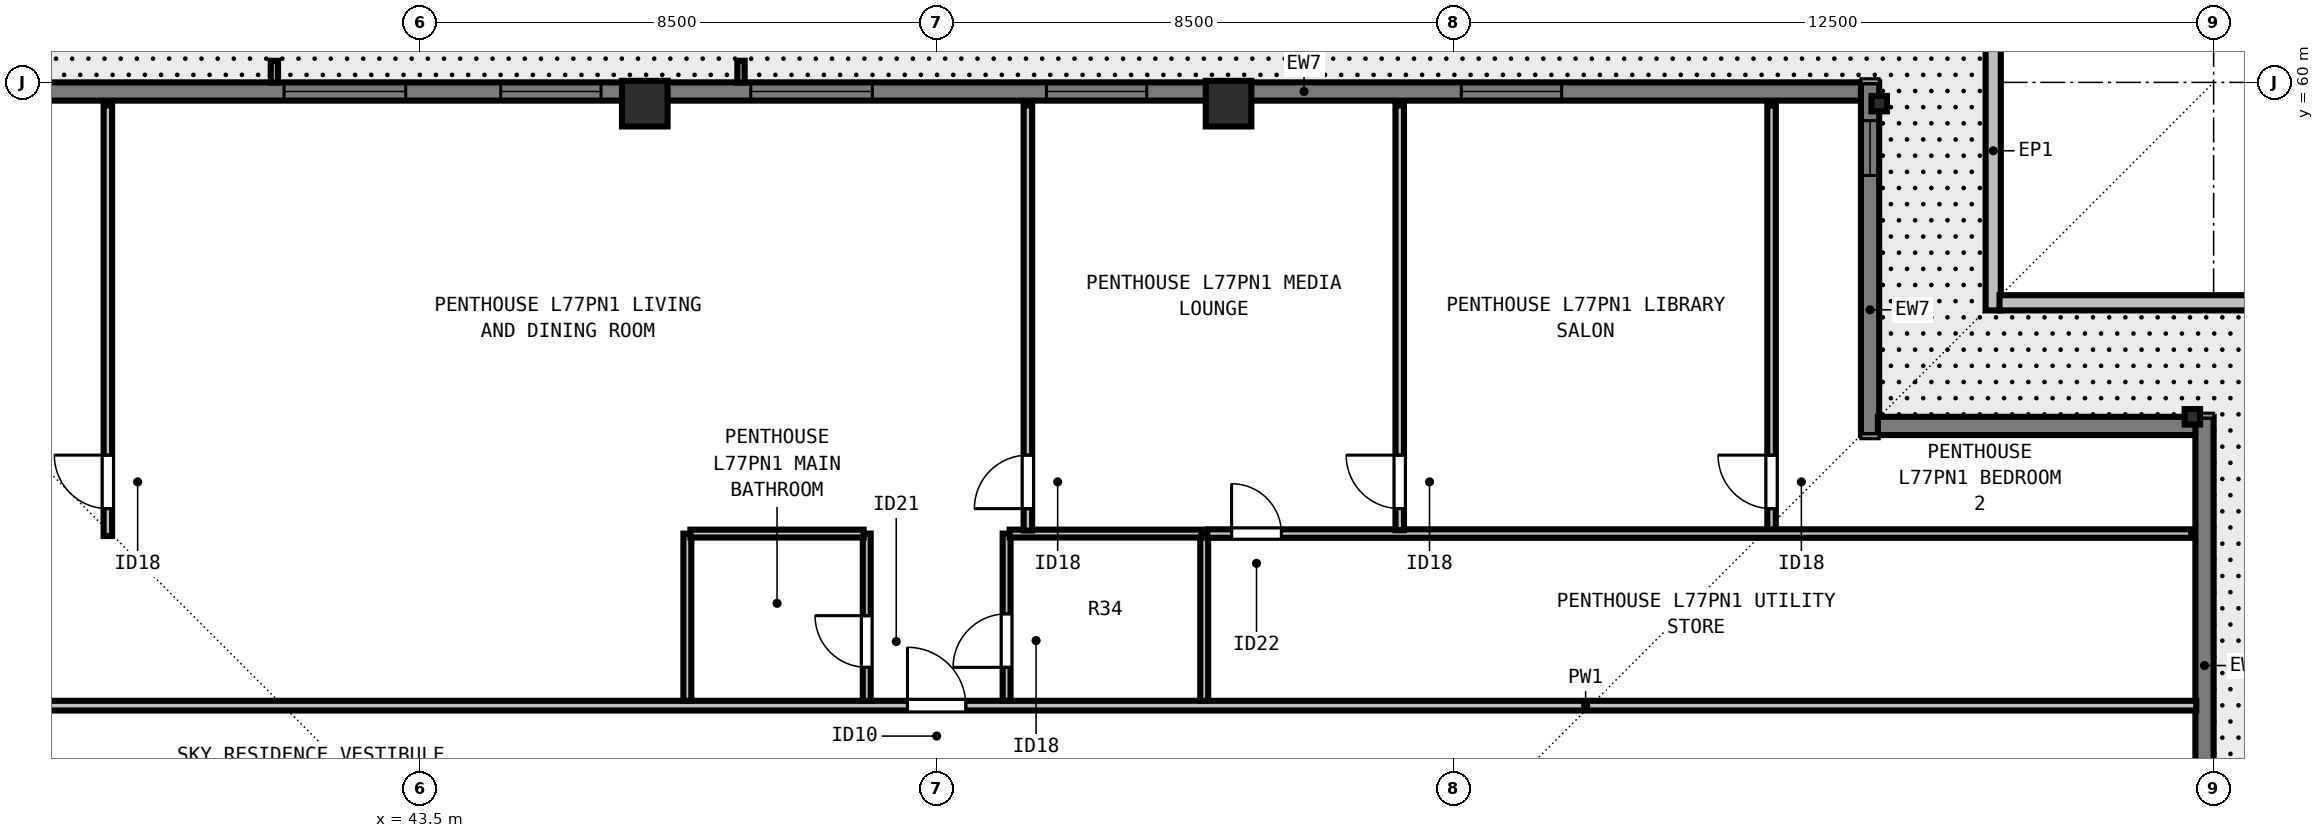
"""IFC4 building model, lengths in metres.
Left out: names, types, materials, properties, quantities, classifications, styles, units other than length and angle.
Written with IfcOpenShell. Run it as: python <this file> out.ifc"""

import sys

from ifc_helpers import new_model, si_unit, direction, frame, frame_2d, origin, origin_2d, place, context, subcontext, project, spatial, rectangle, i_section, extrude, element, fill, save


model = new_model("IFC4")
c1 = context("Model", 3, precision=1e-05, world=origin(), true_north=direction((0.0, 1.0)))
c2 = subcontext(c1, "Body", "Model", "MODEL_VIEW")
j1 = project(units=[si_unit("LENGTHUNIT", "METRE"), si_unit("PLANEANGLEUNIT", "RADIAN")], contexts=[c1])
p1 = place(None, origin())
s1 = spatial("IfcSite", under=j1, at=p1, CompositionType="ELEMENT")
p2 = place(p1, origin())
s2 = spatial("IfcBuilding", under=s1, at=p2, CompositionType="ELEMENT")
p3 = place(p2, frame((0.0, 0.0, 280.5)))
s3 = spatial("IfcBuildingStorey", under=s2, at=p3, CompositionType="ELEMENT", Elevation=280.5)
for number, where, z_axis, x_axis in (
    (1, (72.65, 54.5, 0.0), (0.0, 0.0, 1.0), (0.0, 1.0, 0.0)),
    (2, (67.5, 59.65, 0.0), (0.0, 0.0, 1.0), (1.0, 0.0, 0.0)),
):
    element("IfcColumn", number, at=place(p3, frame(where, z_axis=z_axis, x_axis=x_axis)), inside=s3, PredefinedType="COLUMN", context=c2, shape_type="SweptSolid", body=[
        extrude(i_section(OverallWidth=0.254, OverallDepth=0.254, WebThickness=0.009, FlangeThickness=0.014, FilletRadius=0.013, at=origin_2d()), origin(), (0.0, 0.0, 1.0), 3.5),
    ])
for number, where, z_axis, x_axis in (
    (3, (56.8, 59.65, 0.0), (0.0, 0.0, 1.0), (1.0, 0.0, 0.0)),
    (4, (47.2, 59.65, 0.0), (0.0, 0.0, 1.0), (1.0, 0.0, 0.0)),
):
    element("IfcColumn", number, at=place(p3, frame(where, z_axis=z_axis, x_axis=x_axis)), inside=s3, PredefinedType="COLUMN", context=c2, shape_type="SweptSolid", body=[
        extrude(rectangle(XDim=0.75, YDim=0.75, at=origin_2d()), origin(), (0.0, 0.0, 1.0), 3.5),
    ])
p4 = place(p3, frame((69.375, 61.5, 0.0), z_axis=(0.0, 0.0, 1.0), x_axis=(0.0, -1.0, 0.0)))
e5 = element("IfcWall", 5, at=p4, inside=s3, PredefinedType="PARAPET", context=c2, shape_type="SweptSolid", body=[
    extrude(rectangle(XDim=5.25, YDim=0.25, at=frame_2d((2.625, 0.0))), origin(), (0.0, 0.0, 1.0), 1.15),
])
p5 = place(p3, frame((69.478, 56.375, 0.0), z_axis=(0.0, 0.0, 1.0), x_axis=(1.0, 0.0, 0.0)))
e6 = element("IfcWall", 6, at=p5, inside=s3, PredefinedType="PARAPET", context=c2, shape_type="SweptSolid", body=[
    extrude(rectangle(XDim=4.794, YDim=0.25, at=frame_2d((2.397, 0.0))), origin(), (0.0, 0.0, 1.0), 1.15),
])
p6 = place(p3, frame((36.5, 59.85, 0.0), z_axis=(0.0, 0.0, 1.0), x_axis=(1.0, 0.0, 0.0)))
e7 = element("IfcWall", 7, at=p6, inside=s3, PredefinedType="SOLIDWALL", context=c2, shape_type="SweptSolid", body=[
    extrude(rectangle(XDim=30.722, YDim=0.3, at=frame_2d((15.361, 0.0))), origin(), (0.0, 0.0, 1.0), 3.29),
])
p7 = place(p6, frame((4.769, 0.0, 0.8)))
e8 = element("IfcOpeningElement", 8, at=p7, cuts=e7, PredefinedType="OPENING", context=c2, shape_type="SweptSolid", body=[
    extrude(rectangle(XDim=2.0, YDim=1.758, at=frame_2d((1.0, 0.879))), frame((0.0, 0.16, 0.0), z_axis=(0.0, -1.0, 0.0), x_axis=(1.0, 0.0, 0.0)), (0.0, 0.0, 1.0), 0.32),
])
p8 = place(p6, frame((8.331, 0.0, 0.8)))
e9 = element("IfcOpeningElement", 9, at=p8, cuts=e7, PredefinedType="OPENING", context=c2, shape_type="SweptSolid", body=[
    extrude(rectangle(XDim=1.65, YDim=1.758, at=frame_2d((0.825, 0.879))), frame((0.0, 0.16, 0.0), z_axis=(0.0, -1.0, 0.0), x_axis=(1.0, 0.0, 0.0)), (0.0, 0.0, 1.0), 0.32),
])
p9 = place(p6, frame((12.442, 0.0, 0.8)))
e10 = element("IfcOpeningElement", 10, at=p9, cuts=e7, PredefinedType="OPENING", context=c2, shape_type="SweptSolid", body=[
    extrude(rectangle(XDim=2.0, YDim=1.758, at=frame_2d((1.0, 0.879))), frame((0.0, 0.16, 0.0), z_axis=(0.0, -1.0, 0.0), x_axis=(1.0, 0.0, 0.0)), (0.0, 0.0, 1.0), 0.32),
])
p10 = place(p6, frame((17.304, 0.0, 0.8)))
e11 = element("IfcOpeningElement", 11, at=p10, cuts=e7, PredefinedType="OPENING", context=c2, shape_type="SweptSolid", body=[
    extrude(rectangle(XDim=1.65, YDim=1.758, at=frame_2d((0.825, 0.879))), frame((0.0, 0.16, 0.0), z_axis=(0.0, -1.0, 0.0), x_axis=(1.0, 0.0, 0.0)), (0.0, 0.0, 1.0), 0.32),
])
p11 = place(p6, frame((24.128, 0.0, 0.8)))
e12 = element("IfcOpeningElement", 12, at=p11, cuts=e7, PredefinedType="OPENING", context=c2, shape_type="SweptSolid", body=[
    extrude(rectangle(XDim=1.65, YDim=1.758, at=frame_2d((0.825, 0.879))), frame((0.0, 0.16, 0.0), z_axis=(0.0, -1.0, 0.0), x_axis=(1.0, 0.0, 0.0)), (0.0, 0.0, 1.0), 0.32),
])
p12 = place(p3, frame((67.35, 60.0, 0.0), z_axis=(0.0, 0.0, 1.0), x_axis=(0.0, -1.0, 0.0)))
e13 = element("IfcWall", 13, at=p12, inside=s3, PredefinedType="SOLIDWALL", context=c2, shape_type="SweptSolid", body=[
    extrude(rectangle(XDim=5.8, YDim=0.3, at=frame_2d((2.9, 0.0))), origin(), (0.0, 0.0, 1.0), 3.29),
])
p13 = place(p12, frame((0.63, 0.0, 0.8)))
e14 = element("IfcOpeningElement", 14, at=p13, cuts=e13, PredefinedType="OPENING", context=c2, shape_type="SweptSolid", body=[
    extrude(rectangle(XDim=0.9, YDim=1.75, at=frame_2d((0.45, 0.875))), frame((0.0, 0.16, 0.0), z_axis=(0.0, -1.0, 0.0), x_axis=(1.0, 0.0, 0.0)), (0.0, 0.0, 1.0), 0.32),
])
p14 = place(p3, frame((67.478, 54.35, 0.0), z_axis=(0.0, 0.0, 1.0), x_axis=(1.0, 0.0, 0.0)))
e15 = element("IfcWall", 15, at=p14, inside=s3, PredefinedType="SOLIDWALL", context=c2, shape_type="SweptSolid", body=[
    extrude(rectangle(XDim=5.244, YDim=0.3, at=frame_2d((2.622, 0.0))), origin(), (0.0, 0.0, 1.0), 3.29),
])
p15 = place(p3, frame((72.85, 54.5, 0.0), z_axis=(0.0, 0.0, 1.0), x_axis=(0.0, -1.0, 0.0)))
e16 = element("IfcWall", 16, at=p15, inside=s3, PredefinedType="SOLIDWALL", context=c2, shape_type="SweptSolid", body=[
    extrude(rectangle(XDim=30.722, YDim=0.3, at=frame_2d((15.361, 0.0))), origin(), (0.0, 0.0, 1.0), 3.29),
])
p16 = place(p15, frame((8.331, 0.0, 0.8)))
e17 = element("IfcOpeningElement", 17, at=p16, cuts=e16, PredefinedType="OPENING", context=c2, shape_type="SweptSolid", body=[
    extrude(rectangle(XDim=1.65, YDim=1.758, at=frame_2d((0.825, 0.879))), frame((0.0, 0.16, 0.0), z_axis=(0.0, -1.0, 0.0), x_axis=(1.0, 0.0, 0.0)), (0.0, 0.0, 1.0), 0.32),
])
p17 = place(p15, frame((11.593, 0.0, 0.8)))
e18 = element("IfcOpeningElement", 18, at=p17, cuts=e16, PredefinedType="OPENING", context=c2, shape_type="SweptSolid", body=[
    extrude(rectangle(XDim=2.0, YDim=1.758, at=frame_2d((1.0, 0.879))), frame((0.0, 0.16, 0.0), z_axis=(0.0, -1.0, 0.0), x_axis=(1.0, 0.0, 0.0)), (0.0, 0.0, 1.0), 0.32),
])
p18 = place(p15, frame((16.455, 0.0, 0.8)))
e19 = element("IfcOpeningElement", 19, at=p18, cuts=e16, PredefinedType="OPENING", context=c2, shape_type="SweptSolid", body=[
    extrude(rectangle(XDim=1.65, YDim=1.758, at=frame_2d((0.825, 0.879))), frame((0.0, 0.16, 0.0), z_axis=(0.0, -1.0, 0.0), x_axis=(1.0, 0.0, 0.0)), (0.0, 0.0, 1.0), 0.32),
])
p19 = place(p15, frame((20.967, 0.0, 0.8)))
e20 = element("IfcOpeningElement", 20, at=p19, cuts=e16, PredefinedType="OPENING", context=c2, shape_type="SweptSolid", body=[
    extrude(rectangle(XDim=2.0, YDim=1.758, at=frame_2d((1.0, 0.879))), frame((0.0, 0.16, 0.0), z_axis=(0.0, -1.0, 0.0), x_axis=(1.0, 0.0, 0.0)), (0.0, 0.0, 1.0), 0.32),
])
p20 = place(p3, frame((31.285, 49.75, 0.0), z_axis=(0.0, 0.0, 1.0), x_axis=(1.0, 0.0, 0.0)))
e21 = element("IfcWall", 21, at=p20, inside=s3, PredefinedType="PARTITIONING", context=c2, shape_type="SweptSolid", body=[
    extrude(rectangle(XDim=41.43, YDim=0.16, at=frame_2d((20.715, 0.0))), origin(), (0.0, 0.0, 1.0), 3.009),
])
p21 = place(p20, frame((20.235, 0.0, 0.0)))
e22 = element("IfcOpeningElement", 22, at=p21, cuts=e21, PredefinedType="OPENING", context=c2, shape_type="SweptSolid", body=[
    extrude(rectangle(XDim=0.96, YDim=2.18, at=frame_2d((0.48, 1.09))), frame((0.0, 0.09, 0.0), z_axis=(0.0, -1.0, 0.0), x_axis=(1.0, 0.0, 0.0)), (0.0, 0.0, 1.0), 0.18),
])
p22 = place(p3, frame((47.9, 49.83, 0.0), z_axis=(0.0, 0.0, 1.0), x_axis=(0.0, 1.0, 0.0)))
e23 = element("IfcWall", 23, at=p22, inside=s3, PredefinedType="PLUMBINGWALL", context=c2, shape_type="SweptSolid", body=[
    extrude(rectangle(XDim=2.75, YDim=0.13, at=frame_2d((1.375, 0.0))), origin(), (0.0, 0.0, 1.0), 3.29),
])
p23 = place(p3, frame((50.85, 49.83, 0.0), z_axis=(0.0, 0.0, 1.0), x_axis=(0.0, 1.0, 0.0)))
e24 = element("IfcWall", 24, at=p23, inside=s3, PredefinedType="PLUMBINGWALL", context=c2, shape_type="SweptSolid", body=[
    extrude(rectangle(XDim=2.75, YDim=0.13, at=frame_2d((1.375, 0.0))), origin(), (0.0, 0.0, 1.0), 3.009),
])
p24 = place(p23, frame((0.55, 0.0, 0.0)))
e25 = element("IfcOpeningElement", 25, at=p24, cuts=e24, PredefinedType="OPENING", context=c2, shape_type="SweptSolid", body=[
    extrude(rectangle(XDim=0.85, YDim=2.08, at=frame_2d((0.425, 1.04))), frame((0.0, 0.075, 0.0), z_axis=(0.0, -1.0, 0.0), x_axis=(1.0, 0.0, 0.0)), (0.0, 0.0, 1.0), 0.15),
])
p25 = place(p3, frame((47.95, 52.58, 0.0), z_axis=(0.0, 0.0, 1.0), x_axis=(1.0, 0.0, 0.0)))
e26 = element("IfcWall", 26, at=p25, inside=s3, PredefinedType="PLUMBINGWALL", context=c2, shape_type="SweptSolid", body=[
    extrude(rectangle(XDim=2.85, YDim=0.13, at=frame_2d((1.425, 0.0))), origin(), (0.0, 0.0, 1.0), 3.29),
])
p26 = place(p3, frame((56.4, 49.83, 0.0), z_axis=(0.0, 0.0, 1.0), x_axis=(0.0, 1.0, 0.0)))
e27 = element("IfcWall", 27, at=p26, inside=s3, PredefinedType="PLUMBINGWALL", context=c2, shape_type="SweptSolid", body=[
    extrude(rectangle(XDim=2.75, YDim=0.13, at=frame_2d((1.375, 0.0))), origin(), (0.0, 0.0, 1.0), 3.29),
])
p27 = place(p3, frame((53.15, 49.83, 0.0), z_axis=(0.0, 0.0, 1.0), x_axis=(0.0, 1.0, 0.0)))
e28 = element("IfcWall", 28, at=p27, inside=s3, PredefinedType="PLUMBINGWALL", context=c2, shape_type="SweptSolid", body=[
    extrude(rectangle(XDim=2.75, YDim=0.13, at=frame_2d((1.375, 0.0))), origin(), (0.0, 0.0, 1.0), 3.29),
])
p28 = place(p27, frame((0.55, 0.0, 0.0)))
e29 = element("IfcOpeningElement", 29, at=p28, cuts=e28, PredefinedType="OPENING", context=c2, shape_type="SweptSolid", body=[
    extrude(rectangle(XDim=0.88, YDim=2.1, at=frame_2d((0.44, 1.05))), frame((0.0, 0.075, 0.0), z_axis=(0.0, -1.0, 0.0), x_axis=(1.0, 0.0, 0.0)), (0.0, 0.0, 1.0), 0.15),
])
p29 = place(p3, frame((53.2, 52.58, 0.0), z_axis=(0.0, 0.0, 1.0), x_axis=(1.0, 0.0, 0.0)))
e30 = element("IfcWall", 30, at=p29, inside=s3, PredefinedType="PLUMBINGWALL", context=c2, shape_type="SweptSolid", body=[
    extrude(rectangle(XDim=3.15, YDim=0.13, at=frame_2d((1.575, 0.0))), origin(), (0.0, 0.0, 1.0), 3.29),
])
p30 = place(p3, frame((38.37, 52.54, 0.0), z_axis=(0.0, 0.0, 1.0), x_axis=(0.0, 1.0, 0.0)))
e31 = element("IfcWall", 31, at=p30, inside=s3, PredefinedType="PARTITIONING", context=c2, shape_type="SweptSolid", body=[
    extrude(rectangle(XDim=7.08, YDim=0.14, at=frame_2d((3.54, 0.0))), origin(), (0.0, 0.0, 1.0), 2.653),
])
p31 = place(p30, frame((0.45, 0.0, 0.0)))
e32 = element("IfcOpeningElement", 32, at=p31, cuts=e31, PredefinedType="OPENING", context=c2, shape_type="SweptSolid", body=[
    extrude(rectangle(XDim=0.88, YDim=2.1, at=frame_2d((0.44, 1.05))), frame((0.0, 0.08, 0.0), z_axis=(0.0, -1.0, 0.0), x_axis=(1.0, 0.0, 0.0)), (0.0, 0.0, 1.0), 0.16),
])
p32 = place(p3, frame((65.73, 52.54, 0.0), z_axis=(0.0, 0.0, 1.0), x_axis=(0.0, 1.0, 0.0)))
e33 = element("IfcWall", 33, at=p32, inside=s3, PredefinedType="PARTITIONING", context=c2, shape_type="SweptSolid", body=[
    extrude(rectangle(XDim=7.08, YDim=0.14, at=frame_2d((3.54, 0.0))), origin(), (0.0, 0.0, 1.0), 2.653),
])
p33 = place(p32, frame((0.45, 0.0, 0.0)))
e34 = element("IfcOpeningElement", 34, at=p33, cuts=e33, PredefinedType="OPENING", context=c2, shape_type="SweptSolid", body=[
    extrude(rectangle(XDim=0.88, YDim=2.1, at=frame_2d((0.44, 1.05))), frame((0.0, 0.08, 0.0), z_axis=(0.0, -1.0, 0.0), x_axis=(1.0, 0.0, 0.0)), (0.0, 0.0, 1.0), 0.16),
])
p34 = place(p3, frame((56.45, 52.58, 0.0), z_axis=(0.0, 0.0, 1.0), x_axis=(1.0, 0.0, 0.0)))
e35 = element("IfcWall", 35, at=p34, inside=s3, PredefinedType="PARTITIONING", context=c2, shape_type="SweptSolid", body=[
    extrude(rectangle(XDim=16.18, YDim=0.14, at=frame_2d((8.09, 0.0))), origin(), (0.0, 0.0, 1.0), 3.009),
])
p35 = place(p34, frame((0.4, 0.0, 0.0)))
e36 = element("IfcOpeningElement", 36, at=p35, cuts=e35, PredefinedType="OPENING", context=c2, shape_type="SweptSolid", body=[
    extrude(rectangle(XDim=0.82, YDim=2.1, at=frame_2d((0.41, 1.05))), frame((0.0, 0.08, 0.0), z_axis=(0.0, -1.0, 0.0), x_axis=(1.0, 0.0, 0.0)), (0.0, 0.0, 1.0), 0.16),
])
p36 = place(p3, frame((53.5, 52.63, 0.0), z_axis=(0.0, 0.0, 1.0), x_axis=(0.0, 1.0, 0.0)))
e37 = element("IfcWall", 37, at=p36, inside=s3, PredefinedType="PARTITIONING", context=c2, shape_type="SweptSolid", body=[
    extrude(rectangle(XDim=6.99, YDim=0.14, at=frame_2d((3.495, 0.0))), origin(), (0.0, 0.0, 1.0), 3.009),
])
p37 = place(p36, frame((0.36, 0.0, 0.0)))
e38 = element("IfcOpeningElement", 38, at=p37, cuts=e37, PredefinedType="OPENING", context=c2, shape_type="SweptSolid", body=[
    extrude(rectangle(XDim=0.88, YDim=2.1, at=frame_2d((0.44, 1.05))), frame((0.0, 0.08, 0.0), z_axis=(0.0, -1.0, 0.0), x_axis=(1.0, 0.0, 0.0)), (0.0, 0.0, 1.0), 0.16),
])
p38 = place(p3, frame((59.615, 52.635, 0.0), z_axis=(0.0, 0.0, 1.0), x_axis=(0.0, 1.0, 0.0)))
e39 = element("IfcWall", 39, at=p38, inside=s3, PredefinedType="PARTITIONING", context=c2, shape_type="SweptSolid", body=[
    extrude(rectangle(XDim=6.985, YDim=0.14, at=frame_2d((3.493, 0.0))), origin(), (0.0, 0.0, 1.0), 3.29),
])
p39 = place(p38, frame((0.355, 0.0, 0.0)))
e40 = element("IfcOpeningElement", 40, at=p39, cuts=e39, PredefinedType="OPENING", context=c2, shape_type="SweptSolid", body=[
    extrude(rectangle(XDim=0.88, YDim=2.1, at=frame_2d((0.44, 1.05))), frame((0.0, 0.08, 0.0), z_axis=(0.0, -1.0, 0.0), x_axis=(1.0, 0.0, 0.0)), (0.0, 0.0, 1.0), 0.16),
])
p40 = place(p7, origin())
e41 = element("IfcWindow", 41, at=p40, inside=s3, PartitioningType="SINGLE_PANEL", PredefinedType="WINDOW", context=c2, shape_type="SweptSolid", body=[
    extrude(rectangle(XDim=2.0, YDim=1.758, at=frame_2d((1.0, 0.879))), frame((0.0, -0.05, 0.0), z_axis=(0.0, -1.0, 0.0), x_axis=(1.0, 0.0, 0.0)), (0.0, 0.0, 1.0), 0.06),
])
fill(e8, e41)
p41 = place(p8, origin())
e42 = element("IfcWindow", 42, at=p41, inside=s3, PartitioningType="SINGLE_PANEL", PredefinedType="WINDOW", context=c2, shape_type="SweptSolid", body=[
    extrude(rectangle(XDim=1.65, YDim=1.758, at=frame_2d((0.825, 0.879))), frame((0.0, -0.05, 0.0), z_axis=(0.0, -1.0, 0.0), x_axis=(1.0, 0.0, 0.0)), (0.0, 0.0, 1.0), 0.06),
])
fill(e9, e42)
p42 = place(p9, origin())
e43 = element("IfcWindow", 43, at=p42, inside=s3, PartitioningType="SINGLE_PANEL", PredefinedType="WINDOW", context=c2, shape_type="SweptSolid", body=[
    extrude(rectangle(XDim=2.0, YDim=1.758, at=frame_2d((1.0, 0.879))), frame((0.0, -0.05, 0.0), z_axis=(0.0, -1.0, 0.0), x_axis=(1.0, 0.0, 0.0)), (0.0, 0.0, 1.0), 0.06),
])
fill(e10, e43)
p43 = place(p10, origin())
e44 = element("IfcWindow", 44, at=p43, inside=s3, PartitioningType="SINGLE_PANEL", PredefinedType="WINDOW", context=c2, shape_type="SweptSolid", body=[
    extrude(rectangle(XDim=1.65, YDim=1.758, at=frame_2d((0.825, 0.879))), frame((0.0, -0.05, 0.0), z_axis=(0.0, -1.0, 0.0), x_axis=(1.0, 0.0, 0.0)), (0.0, 0.0, 1.0), 0.06),
])
fill(e11, e44)
p44 = place(p11, origin())
e45 = element("IfcWindow", 45, at=p44, inside=s3, PartitioningType="SINGLE_PANEL", PredefinedType="WINDOW", context=c2, shape_type="SweptSolid", body=[
    extrude(rectangle(XDim=1.65, YDim=1.758, at=frame_2d((0.825, 0.879))), frame((0.0, -0.05, 0.0), z_axis=(0.0, -1.0, 0.0), x_axis=(1.0, 0.0, 0.0)), (0.0, 0.0, 1.0), 0.06),
])
fill(e12, e45)
p45 = place(p13, origin())
e46 = element("IfcWindow", 46, at=p45, inside=s3, PartitioningType="SINGLE_PANEL", PredefinedType="WINDOW", context=c2, shape_type="SweptSolid", body=[
    extrude(rectangle(XDim=0.9, YDim=1.75, at=frame_2d((0.45, 0.875))), frame((0.0, -0.04, 0.0), z_axis=(0.0, -1.0, 0.0), x_axis=(1.0, 0.0, 0.0)), (0.0, 0.0, 1.0), 0.06),
])
fill(e14, e46)
p46 = place(p24, origin())
e47 = element("IfcDoor", 47, at=p46, inside=s3, OperationType="SINGLE_SWING_RIGHT", PredefinedType="DOOR", context=c2, shape_type="SweptSolid", body=[
    extrude(rectangle(XDim=0.85, YDim=2.08, at=frame_2d((0.425, 1.04))), frame((0.0, 0.025, 0.0), z_axis=(0.0, -1.0, 0.0), x_axis=(1.0, 0.0, 0.0)), (0.0, 0.0, 1.0), 0.05),
])
fill(e25, e47)
p47 = place(p28, origin())
e48 = element("IfcDoor", 48, at=p47, inside=s3, OperationType="SINGLE_SWING_LEFT", PredefinedType="DOOR", context=c2, shape_type="SweptSolid", body=[
    extrude(rectangle(XDim=0.88, YDim=2.1, at=frame_2d((0.44, 1.05))), frame((0.0, 0.025, 0.0), z_axis=(0.0, -1.0, 0.0), x_axis=(1.0, 0.0, 0.0)), (0.0, 0.0, 1.0), 0.05),
])
fill(e29, e48)
p48 = place(p31, origin())
e49 = element("IfcDoor", 49, at=p48, inside=s3, OperationType="SINGLE_SWING_RIGHT", PredefinedType="DOOR", context=c2, shape_type="SweptSolid", body=[
    extrude(rectangle(XDim=0.88, YDim=2.1, at=frame_2d((0.44, 1.05))), frame((0.0, 0.025, 0.0), z_axis=(0.0, -1.0, 0.0), x_axis=(1.0, 0.0, 0.0)), (0.0, 0.0, 1.0), 0.05),
])
fill(e32, e49)
p49 = place(p35, origin())
e50 = element("IfcDoor", 50, at=p49, inside=s3, OperationType="SINGLE_SWING_LEFT", PredefinedType="DOOR", context=c2, shape_type="SweptSolid", body=[
    extrude(rectangle(XDim=0.82, YDim=2.1, at=frame_2d((0.41, 1.05))), frame((0.0, 0.025, 0.0), z_axis=(0.0, -1.0, 0.0), x_axis=(1.0, 0.0, 0.0)), (0.0, 0.0, 1.0), 0.05),
])
fill(e36, e50)
p50 = place(p33, origin())
e51 = element("IfcDoor", 51, at=p50, inside=s3, OperationType="SINGLE_SWING_RIGHT", PredefinedType="DOOR", context=c2, shape_type="SweptSolid", body=[
    extrude(rectangle(XDim=0.88, YDim=2.1, at=frame_2d((0.44, 1.05))), frame((0.0, 0.025, 0.0), z_axis=(0.0, -1.0, 0.0), x_axis=(1.0, 0.0, 0.0)), (0.0, 0.0, 1.0), 0.05),
])
fill(e34, e51)
p51 = place(p37, origin())
e52 = element("IfcDoor", 52, at=p51, inside=s3, OperationType="SINGLE_SWING_LEFT", PredefinedType="DOOR", context=c2, shape_type="SweptSolid", body=[
    extrude(rectangle(XDim=0.88, YDim=2.1, at=frame_2d((0.44, 1.05))), frame((0.0, 0.025, 0.0), z_axis=(0.0, -1.0, 0.0), x_axis=(1.0, 0.0, 0.0)), (0.0, 0.0, 1.0), 0.05),
])
fill(e38, e52)
p52 = place(p39, origin())
e53 = element("IfcDoor", 53, at=p52, inside=s3, OperationType="SINGLE_SWING_RIGHT", PredefinedType="DOOR", context=c2, shape_type="SweptSolid", body=[
    extrude(rectangle(XDim=0.88, YDim=2.1, at=frame_2d((0.44, 1.05))), frame((0.0, 0.025, 0.0), z_axis=(0.0, -1.0, 0.0), x_axis=(1.0, 0.0, 0.0)), (0.0, 0.0, 1.0), 0.05),
])
fill(e40, e53)
p53 = place(p21, origin())
e54 = element("IfcDoor", 54, at=p53, inside=s3, OperationType="SINGLE_SWING_LEFT", PredefinedType="DOOR", context=c2, shape_type="SweptSolid", body=[
    extrude(rectangle(XDim=0.96, YDim=2.18, at=frame_2d((0.48, 1.09))), frame((0.0, 0.025, 0.0), z_axis=(0.0, -1.0, 0.0), x_axis=(1.0, 0.0, 0.0)), (0.0, 0.0, 1.0), 0.05),
])
fill(e22, e54)
save(model, sys.argv[1])
